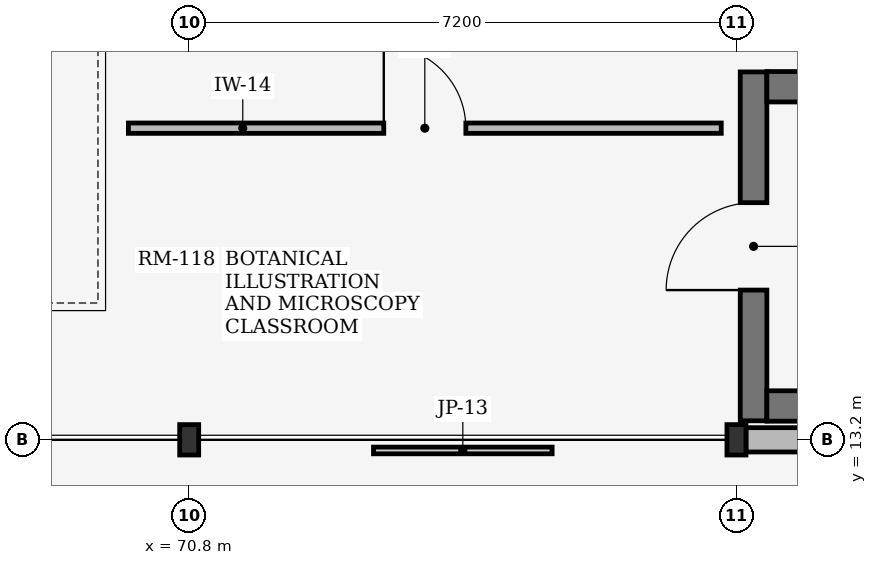
"""IFC4 building model, lengths in metres.
Left out: names, types, materials, properties, quantities, classifications, styles, units other than length and angle.
Written with IfcOpenShell. Run it as: python <this file> out.ifc"""

import sys

from ifc_helpers import new_model, si_unit, direction, frame, frame_2d, origin, origin_2d, place, context, subcontext, project, spatial, rectangle, i_section, extrude, element, fill, save


model = new_model("IFC4")
c1 = context("Model", 3, precision=1e-05, world=origin(), true_north=direction((0.0, 1.0)))
c2 = subcontext(c1, "Body", "Model", "MODEL_VIEW")
j1 = project(units=[si_unit("LENGTHUNIT", "METRE"), si_unit("PLANEANGLEUNIT", "RADIAN")], contexts=[c1])
p1 = place(None, origin())
s1 = spatial("IfcSite", under=j1, at=p1, CompositionType="ELEMENT")
p2 = place(p1, origin())
s2 = spatial("IfcBuilding", under=s1, at=p2, CompositionType="ELEMENT")
p3 = place(p2, frame((0.0, 0.0, 9.0)))
s3 = spatial("IfcBuildingStorey", under=s2, at=p3, CompositionType="ELEMENT", Elevation=9.0)
for number, where, z_axis, x_axis in (
    (1, (70.8, 13.2, 0.0), (0.0, 0.0, 1.0), (1.0, 0.0, 0.0)),
    (2, (78.0, 13.2, 0.0), (0.0, 0.0, 1.0), (1.0, 0.0, 0.0)),
):
    element("IfcColumn", number, at=place(p3, frame(where, z_axis=z_axis, x_axis=x_axis)), inside=s3, PredefinedType="COLUMN", context=c2, shape_type="SweptSolid", body=[
        extrude(i_section(OverallWidth=0.25, OverallDepth=0.4, WebThickness=0.01, FlangeThickness=0.013, at=origin_2d()), origin(), (0.0, 0.0, 1.0), 3.96),
    ])
p4 = place(p3, frame((78.125, 13.2, 0.0), z_axis=(0.0, 0.0, 1.0), x_axis=(1.0, 0.0, 0.0)))
e3 = element("IfcWall", 3, at=p4, inside=s3, PredefinedType="STANDARD", context=c2, shape_type="SweptSolid", body=[
    extrude(rectangle(XDim=8.75, YDim=0.32, at=frame_2d((4.375, 0.0))), origin(), (0.0, 0.0, 1.0), 3.42),
])
p5 = place(p4, frame((3.125, 0.0, 0.75)))
e4 = element("IfcOpeningElement", 4, at=p5, cuts=e3, PredefinedType="OPENING", context=c2, shape_type="SweptSolid", body=[
    extrude(rectangle(XDim=2.5, YDim=1.35, at=frame_2d((1.25, 0.675))), frame((0.0, 0.17, 0.0), z_axis=(0.0, -1.0, 0.0), x_axis=(1.0, 0.0, 0.0)), (0.0, 0.0, 1.0), 0.34),
])
p6 = place(p3, frame((78.225, 13.45, 0.0), z_axis=(0.0, 0.0, 1.0), x_axis=(0.0, 1.0, 0.0)))
e5 = element("IfcWall", 5, at=p6, inside=s3, PredefinedType="SHEAR", context=c2, shape_type="SweptSolid", body=[
    extrude(rectangle(XDim=4.59, YDim=0.35, at=frame_2d((2.295, 0.0))), origin(), (0.0, 0.0, 1.0), 3.96),
])
p7 = place(p6, frame((1.72, 0.0, 0.0)))
e6 = element("IfcOpeningElement", 6, at=p7, cuts=e5, PredefinedType="OPENING", context=c2, shape_type="SweptSolid", body=[
    extrude(rectangle(XDim=1.15, YDim=2.2, at=frame_2d((0.575, 1.1))), frame((0.0, 0.185, 0.0), z_axis=(0.0, -1.0, 0.0), x_axis=(1.0, 0.0, 0.0)), (0.0, 0.0, 1.0), 0.37),
])
for number, where, z_axis, x_axis in (
    (7, (78.4, 13.645, 0.0), (0.0, 0.0, 1.0), (1.0, 0.0, 0.0)),
    (8, (78.4, 17.845, 0.0), (0.0, 0.0, 1.0), (1.0, 0.0, 0.0)),
):
    element("IfcWall", number, at=place(p3, frame(where, z_axis=z_axis, x_axis=x_axis)), inside=s3, PredefinedType="SHEAR", context=c2, shape_type="SweptSolid", body=[
        extrude(rectangle(XDim=7.98, YDim=0.4, at=frame_2d((3.99, 0.0))), origin(), (0.0, 0.0, 1.0), 3.96),
    ])
p8 = place(p3, frame((70.0, 17.3, 0.0), z_axis=(0.0, 0.0, 1.0), x_axis=(1.0, 0.0, 0.0)))
e9 = element("IfcWall", 9, at=p8, inside=s3, PredefinedType="PARTITIONING", context=c2, shape_type="SweptSolid", body=[
    extrude(rectangle(XDim=7.8, YDim=0.136, at=frame_2d((3.9, 0.0))), origin(), (0.0, 0.0, 1.0), 3.94),
])
p9 = place(p8, frame((3.36, 0.0, 0.0)))
e10 = element("IfcOpeningElement", 10, at=p9, cuts=e9, PredefinedType="OPENING", context=c2, shape_type="SweptSolid", body=[
    extrude(rectangle(XDim=1.08, YDim=2.1, at=frame_2d((0.54, 1.05))), frame((0.0, 0.078, 0.0), z_axis=(0.0, -1.0, 0.0), x_axis=(1.0, 0.0, 0.0)), (0.0, 0.0, 1.0), 0.156),
])
p10 = place(p7, origin())
e11 = element("IfcDoor", 11, at=p10, inside=s3, OperationType="SINGLE_SWING_LEFT", PredefinedType="DOOR", context=c2, shape_type="SweptSolid", body=[
    extrude(rectangle(XDim=1.15, YDim=2.2, at=frame_2d((0.575, 1.1))), frame((0.0, 0.025, 0.0), z_axis=(0.0, -1.0, 0.0), x_axis=(1.0, 0.0, 0.0)), (0.0, 0.0, 1.0), 0.05),
])
fill(e6, e11)
p11 = place(p9, origin())
e12 = element("IfcDoor", 12, at=p11, inside=s3, OperationType="SINGLE_SWING_LEFT", PredefinedType="DOOR", context=c2, shape_type="SweptSolid", body=[
    extrude(rectangle(XDim=1.08, YDim=2.1, at=frame_2d((0.54, 1.05))), frame((0.0, 0.025, 0.0), z_axis=(0.0, -1.0, 0.0), x_axis=(1.0, 0.0, 0.0)), (0.0, 0.0, 1.0), 0.05),
])
fill(e10, e12)
save(model, sys.argv[1])
